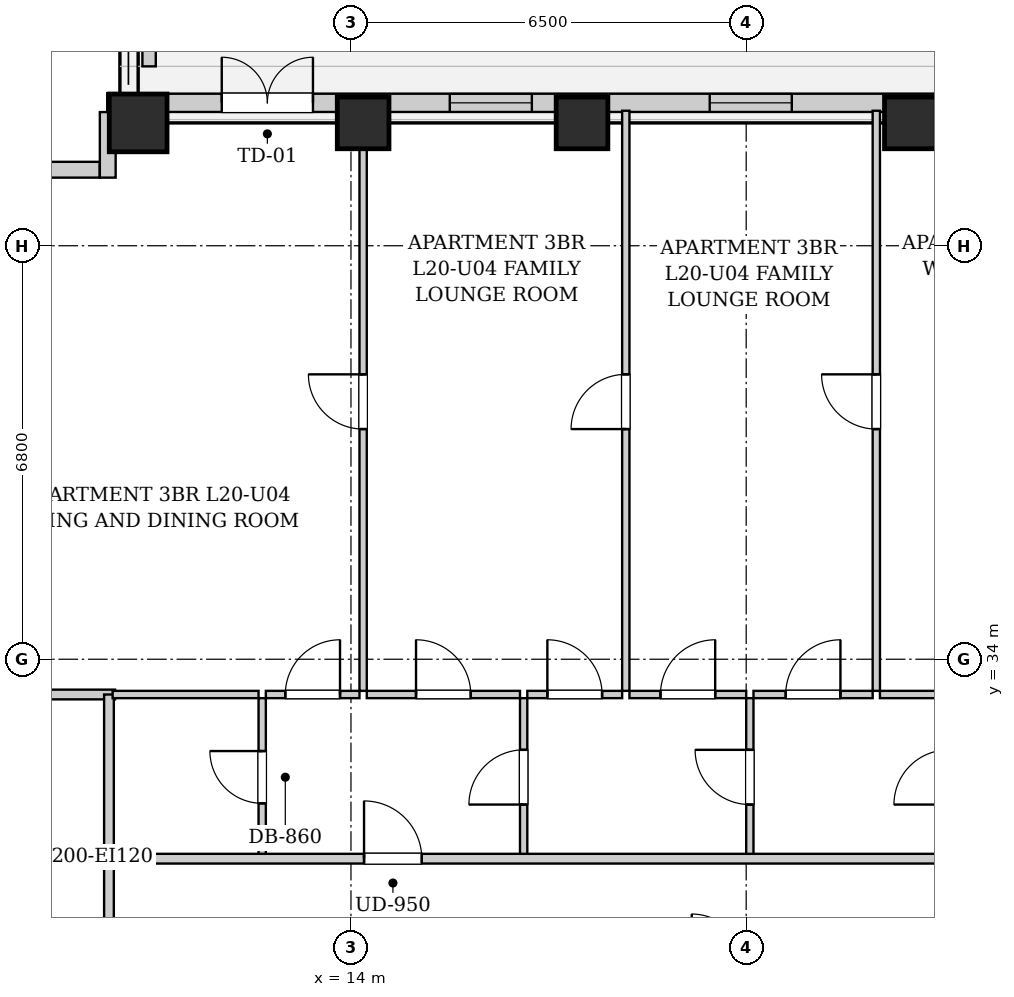
"""IFC4 building model, lengths in metres.
Left out: names, types, materials, properties, quantities, classifications, styles, units other than length and angle.
Written with IfcOpenShell. Run it as: python <this file> out.ifc"""

import sys

from ifc_helpers import new_model, si_unit, direction, frame, frame_2d, origin, origin_2d, place, context, subcontext, project, spatial, rectangle, extrude, element, fill, save


model = new_model("IFC4")
c1 = context("Model", 3, precision=1e-05, world=origin(), true_north=direction((0.0, 1.0)))
c2 = subcontext(c1, "Body", "Model", "MODEL_VIEW")
j1 = project(units=[si_unit("LENGTHUNIT", "METRE"), si_unit("PLANEANGLEUNIT", "RADIAN")], contexts=[c1])
p1 = place(None, origin())
s1 = spatial("IfcSite", under=j1, at=p1, CompositionType="ELEMENT")
p2 = place(p1, origin())
s2 = spatial("IfcBuilding", under=s1, at=p2, CompositionType="ELEMENT")
p3 = place(p2, frame((0.0, 0.0, 75.1)))
s3 = spatial("IfcBuildingStorey", under=s2, at=p3, CompositionType="ELEMENT", Elevation=75.1)
p4 = place(p3, frame((10.5, 42.82, 0.0), z_axis=(0.0, 0.0, 1.0), x_axis=(1.0, 0.0, 0.0)))
e1 = element("IfcColumn", 1, at=p4, inside=s3, PredefinedType="COLUMN", context=c2, shape_type="SweptSolid", body=[
    extrude(rectangle(XDim=0.95, YDim=0.95, at=origin_2d()), origin(), (0.0, 0.0, 1.0), 3.2),
])
for number, where, z_axis, x_axis in (
    (2, (14.2, 42.82, 0.0), (0.0, 0.0, 1.0), (1.0, 0.0, 0.0)),
    (3, (17.8, 42.82, 0.0), (0.0, 0.0, 1.0), (1.0, 0.0, 0.0)),
    (4, (23.2, 42.82, 0.0), (0.0, 0.0, 1.0), (1.0, 0.0, 0.0)),
):
    element("IfcColumn", number, at=place(p3, frame(where, z_axis=z_axis, x_axis=x_axis)), inside=s3, PredefinedType="COLUMN", context=c2, shape_type="SweptSolid", body=[
        extrude(rectangle(XDim=0.85, YDim=0.85, at=origin_2d()), origin(), (0.0, 0.0, 1.0), 3.2),
    ])
p5 = place(p3, frame((10.0, 43.15, 0.0), z_axis=(0.0, 0.0, 1.0), x_axis=(1.0, 0.0, 0.0)))
e5 = element("IfcWall", 5, at=p5, inside=s3, PredefinedType="SOLIDWALL", context=c2, shape_type="SweptSolid", body=[
    extrude(rectangle(XDim=23.7, YDim=0.3, at=frame_2d((11.85, 0.0))), origin(), (0.0, 0.0, 1.0), 2.94),
])
p6 = place(p5, frame((1.875, 0.0, 0.0)))
e6 = element("IfcOpeningElement", 6, at=p6, cuts=e5, PredefinedType="OPENING", context=c2, shape_type="SweptSolid", body=[
    extrude(rectangle(XDim=1.5, YDim=1.982, at=frame_2d((0.75, 0.991))), frame((0.0, 0.16, 0.0), z_axis=(0.0, -1.0, 0.0), x_axis=(1.0, 0.0, 0.0)), (0.0, 0.0, 1.0), 0.32),
])
p7 = place(p5, frame((5.625, 0.0, 0.55)))
e7 = element("IfcOpeningElement", 7, at=p7, cuts=e5, PredefinedType="OPENING", context=c2, shape_type="SweptSolid", body=[
    extrude(rectangle(XDim=1.35, YDim=1.2, at=frame_2d((0.675, 0.6))), frame((0.0, 0.16, 0.0), z_axis=(0.0, -1.0, 0.0), x_axis=(1.0, 0.0, 0.0)), (0.0, 0.0, 1.0), 0.32),
])
p8 = place(p5, frame((9.9, 0.0, 0.55)))
e8 = element("IfcOpeningElement", 8, at=p8, cuts=e5, PredefinedType="OPENING", context=c2, shape_type="SweptSolid", body=[
    extrude(rectangle(XDim=1.35, YDim=1.2, at=frame_2d((0.675, 0.6))), frame((0.0, 0.16, 0.0), z_axis=(0.0, -1.0, 0.0), x_axis=(1.0, 0.0, 0.0)), (0.0, 0.0, 1.0), 0.32),
])
p9 = place(p5, frame((18.675, 0.0, 0.55)))
e9 = element("IfcOpeningElement", 9, at=p9, cuts=e5, PredefinedType="OPENING", context=c2, shape_type="SweptSolid", body=[
    extrude(rectangle(XDim=1.35, YDim=1.2, at=frame_2d((0.675, 0.6))), frame((0.0, 0.16, 0.0), z_axis=(0.0, -1.0, 0.0), x_axis=(1.0, 0.0, 0.0)), (0.0, 0.0, 1.0), 0.32),
])
p10 = place(p5, frame((21.265, 0.0, 0.55)))
e10 = element("IfcOpeningElement", 10, at=p10, cuts=e5, PredefinedType="OPENING", context=c2, shape_type="SweptSolid", body=[
    extrude(rectangle(XDim=1.35, YDim=1.2, at=frame_2d((0.675, 0.6))), frame((0.0, 0.16, 0.0), z_axis=(0.0, -1.0, 0.0), x_axis=(1.0, 0.0, 0.0)), (0.0, 0.0, 1.0), 0.32),
])
p11 = place(p3, frame((8.882, 42.05, 0.0), z_axis=(0.0, 0.0, 1.0), x_axis=(1.0, 0.0, 0.0)))
e11 = element("IfcWall", 11, at=p11, inside=s3, PredefinedType="SOLIDWALL", context=c2, shape_type="SweptSolid", body=[
    extrude(rectangle(XDim=0.986, YDim=0.26, at=frame_2d((0.493, 0.0))), origin(), (0.0, 0.0, 1.0), 2.94),
])
p12 = place(p3, frame((10.0, 41.92, 0.0), z_axis=(0.0, 0.0, 1.0), x_axis=(0.0, 1.0, 0.0)))
e12 = element("IfcWall", 12, at=p12, inside=s3, PredefinedType="SOLIDWALL", context=c2, shape_type="SweptSolid", body=[
    extrude(rectangle(XDim=1.078, YDim=0.26, at=frame_2d((0.539, 0.0))), origin(), (0.0, 0.0, 1.0), 2.94),
])
p13 = place(p3, frame((10.68, 43.75, 0.0), z_axis=(0.0, 0.0, 1.0), x_axis=(0.0, 1.0, 0.0)))
e13 = element("IfcWall", 13, at=p13, inside=s3, PredefinedType="PARAPET", context=c2, shape_type="SweptSolid", body=[
    extrude(rectangle(XDim=3.0, YDim=0.22, at=frame_2d((1.5, 0.0))), origin(), (0.0, 0.0, 1.0), 0.65),
])
p14 = place(p3, frame((10.02, 28.98, 0.0), z_axis=(0.0, 0.0, 1.0), x_axis=(0.0, 1.0, 0.0)))
e14 = element("IfcWall", 14, at=p14, inside=s3, PredefinedType="PARTITIONING", context=c2, shape_type="SweptSolid", body=[
    extrude(rectangle(XDim=1.74, YDim=0.16, at=frame_2d((0.87, 0.0))), origin(), (0.0, 0.0, 1.0), 2.94),
])
p15 = place(p3, frame((7.78, 33.42, 0.0), z_axis=(0.0, 0.0, 1.0), x_axis=(1.0, 0.0, 0.0)))
e15 = element("IfcWall", 15, at=p15, inside=s3, PredefinedType="PARTITIONING", context=c2, shape_type="SweptSolid", body=[
    extrude(rectangle(XDim=2.34, YDim=0.16, at=frame_2d((1.17, 0.0))), origin(), (0.0, 0.0, 1.0), 2.94),
])
p16 = place(p3, frame((10.02, 30.76, 0.0), z_axis=(0.0, 0.0, 1.0), x_axis=(0.0, 1.0, 0.0)))
e16 = element("IfcWall", 16, at=p16, inside=s3, PredefinedType="PARTITIONING", context=c2, shape_type="SweptSolid", body=[
    extrude(rectangle(XDim=2.66, YDim=0.16, at=frame_2d((1.33, 0.0))), origin(), (0.0, 0.0, 1.0), 2.94),
])
p17 = place(p3, frame((12.54, 30.76, 0.0), z_axis=(0.0, 0.0, 1.0), x_axis=(0.0, 1.0, 0.0)))
e17 = element("IfcWall", 17, at=p17, inside=s3, PredefinedType="PARTITIONING", context=c2, shape_type="SweptSolid", body=[
    extrude(rectangle(XDim=2.6, YDim=0.12, at=frame_2d((1.3, 0.0))), origin(), (0.0, 0.0, 1.0), 2.94),
])
p18 = place(p17, frame((0.87, 0.0, 0.0)))
e18 = element("IfcOpeningElement", 18, at=p18, cuts=e17, PredefinedType="OPENING", context=c2, shape_type="SweptSolid", body=[
    extrude(rectangle(XDim=0.86, YDim=2.05, at=frame_2d((0.43, 1.025))), frame((0.0, 0.07, 0.0), z_axis=(0.0, -1.0, 0.0), x_axis=(1.0, 0.0, 0.0)), (0.0, 0.0, 1.0), 0.14),
])
p19 = place(p3, frame((10.08, 33.42, 0.0), z_axis=(0.0, 0.0, 1.0), x_axis=(1.0, 0.0, 0.0)))
e19 = element("IfcWall", 19, at=p19, inside=s3, PredefinedType="PARTITIONING", context=c2, shape_type="SweptSolid", body=[
    extrude(rectangle(XDim=2.4, YDim=0.12, at=frame_2d((1.2, 0.0))), origin(), (0.0, 0.0, 1.0), 2.94),
])
p20 = place(p3, frame((16.84, 30.76, 0.0), z_axis=(0.0, 0.0, 1.0), x_axis=(0.0, 1.0, 0.0)))
e20 = element("IfcWall", 20, at=p20, inside=s3, PredefinedType="PARTITIONING", context=c2, shape_type="SweptSolid", body=[
    extrude(rectangle(XDim=2.6, YDim=0.12, at=frame_2d((1.3, 0.0))), origin(), (0.0, 0.0, 1.0), 2.94),
])
p21 = place(p20, frame((0.85, 0.0, 0.0)))
e21 = element("IfcOpeningElement", 21, at=p21, cuts=e20, PredefinedType="OPENING", context=c2, shape_type="SweptSolid", body=[
    extrude(rectangle(XDim=0.9, YDim=2.05, at=frame_2d((0.45, 1.025))), frame((0.0, 0.07, 0.0), z_axis=(0.0, -1.0, 0.0), x_axis=(1.0, 0.0, 0.0)), (0.0, 0.0, 1.0), 0.14),
])
p22 = place(p3, frame((12.6, 33.42, 0.0), z_axis=(0.0, 0.0, 1.0), x_axis=(1.0, 0.0, 0.0)))
e22 = element("IfcWall", 22, at=p22, inside=s3, PredefinedType="PARTITIONING", context=c2, shape_type="SweptSolid", body=[
    extrude(rectangle(XDim=1.54, YDim=0.12, at=frame_2d((0.77, 0.0))), origin(), (0.0, 0.0, 1.0), 2.94),
])
p23 = place(p22, frame((0.32, 0.0, 0.0)))
e23 = element("IfcOpeningElement", 23, at=p23, cuts=e22, PredefinedType="OPENING", context=c2, shape_type="SweptSolid", body=[
    extrude(rectangle(XDim=0.9, YDim=2.05, at=frame_2d((0.45, 1.025))), frame((0.0, 0.07, 0.0), z_axis=(0.0, -1.0, 0.0), x_axis=(1.0, 0.0, 0.0)), (0.0, 0.0, 1.0), 0.14),
])
p24 = place(p3, frame((14.26, 33.42, 0.0), z_axis=(0.0, 0.0, 1.0), x_axis=(1.0, 0.0, 0.0)))
e24 = element("IfcWall", 24, at=p24, inside=s3, PredefinedType="PARTITIONING", context=c2, shape_type="SweptSolid", body=[
    extrude(rectangle(XDim=2.52, YDim=0.12, at=frame_2d((1.26, 0.0))), origin(), (0.0, 0.0, 1.0), 2.94),
])
p25 = place(p24, frame((0.81, 0.0, 0.0)))
e25 = element("IfcOpeningElement", 25, at=p25, cuts=e24, PredefinedType="OPENING", context=c2, shape_type="SweptSolid", body=[
    extrude(rectangle(XDim=0.9, YDim=2.05, at=frame_2d((0.45, 1.025))), frame((0.0, 0.07, 0.0), z_axis=(0.0, -1.0, 0.0), x_axis=(1.0, 0.0, 0.0)), (0.0, 0.0, 1.0), 0.14),
])
p26 = place(p3, frame((20.56, 30.76, 0.0), z_axis=(0.0, 0.0, 1.0), x_axis=(0.0, 1.0, 0.0)))
e26 = element("IfcWall", 26, at=p26, inside=s3, PredefinedType="PARTITIONING", context=c2, shape_type="SweptSolid", body=[
    extrude(rectangle(XDim=2.6, YDim=0.12, at=frame_2d((1.3, 0.0))), origin(), (0.0, 0.0, 1.0), 2.94),
])
p27 = place(p26, frame((0.85, 0.0, 0.0)))
e27 = element("IfcOpeningElement", 27, at=p27, cuts=e26, PredefinedType="OPENING", context=c2, shape_type="SweptSolid", body=[
    extrude(rectangle(XDim=0.9, YDim=2.05, at=frame_2d((0.45, 1.025))), frame((0.0, 0.07, 0.0), z_axis=(0.0, -1.0, 0.0), x_axis=(1.0, 0.0, 0.0)), (0.0, 0.0, 1.0), 0.14),
])
p28 = place(p3, frame((16.9, 33.42, 0.0), z_axis=(0.0, 0.0, 1.0), x_axis=(1.0, 0.0, 0.0)))
e28 = element("IfcWall", 28, at=p28, inside=s3, PredefinedType="PARTITIONING", context=c2, shape_type="SweptSolid", body=[
    extrude(rectangle(XDim=1.56, YDim=0.12, at=frame_2d((0.78, 0.0))), origin(), (0.0, 0.0, 1.0), 2.94),
])
p29 = place(p28, frame((0.33, 0.0, 0.0)))
e29 = element("IfcOpeningElement", 29, at=p29, cuts=e28, PredefinedType="OPENING", context=c2, shape_type="SweptSolid", body=[
    extrude(rectangle(XDim=0.9, YDim=2.05, at=frame_2d((0.45, 1.025))), frame((0.0, 0.07, 0.0), z_axis=(0.0, -1.0, 0.0), x_axis=(1.0, 0.0, 0.0)), (0.0, 0.0, 1.0), 0.14),
])
p30 = place(p3, frame((18.58, 33.42, 0.0), z_axis=(0.0, 0.0, 1.0), x_axis=(1.0, 0.0, 0.0)))
e30 = element("IfcWall", 30, at=p30, inside=s3, PredefinedType="PARTITIONING", context=c2, shape_type="SweptSolid", body=[
    extrude(rectangle(XDim=1.92, YDim=0.12, at=frame_2d((0.96, 0.0))), origin(), (0.0, 0.0, 1.0), 2.94),
])
p31 = place(p30, frame((0.51, 0.0, 0.0)))
e31 = element("IfcOpeningElement", 31, at=p31, cuts=e30, PredefinedType="OPENING", context=c2, shape_type="SweptSolid", body=[
    extrude(rectangle(XDim=0.9, YDim=2.05, at=frame_2d((0.45, 1.025))), frame((0.0, 0.07, 0.0), z_axis=(0.0, -1.0, 0.0), x_axis=(1.0, 0.0, 0.0)), (0.0, 0.0, 1.0), 0.14),
])
p32 = place(p3, frame((20.62, 33.42, 0.0), z_axis=(0.0, 0.0, 1.0), x_axis=(1.0, 0.0, 0.0)))
e32 = element("IfcWall", 32, at=p32, inside=s3, PredefinedType="PARTITIONING", context=c2, shape_type="SweptSolid", body=[
    extrude(rectangle(XDim=1.96, YDim=0.12, at=frame_2d((0.98, 0.0))), origin(), (0.0, 0.0, 1.0), 2.94),
])
p33 = place(p32, frame((0.53, 0.0, 0.0)))
e33 = element("IfcOpeningElement", 33, at=p33, cuts=e32, PredefinedType="OPENING", context=c2, shape_type="SweptSolid", body=[
    extrude(rectangle(XDim=0.9, YDim=2.05, at=frame_2d((0.45, 1.025))), frame((0.0, 0.07, 0.0), z_axis=(0.0, -1.0, 0.0), x_axis=(1.0, 0.0, 0.0)), (0.0, 0.0, 1.0), 0.14),
])
p34 = place(p3, frame((22.7, 33.42, 0.0), z_axis=(0.0, 0.0, 1.0), x_axis=(1.0, 0.0, 0.0)))
e34 = element("IfcWall", 34, at=p34, inside=s3, PredefinedType="PARTITIONING", context=c2, shape_type="SweptSolid", body=[
    extrude(rectangle(XDim=1.07, YDim=0.12, at=frame_2d((0.535, 0.0))), origin(), (0.0, 0.0, 1.0), 2.94),
])
p35 = place(p3, frame((14.2, 33.48, 0.0), z_axis=(0.0, 0.0, 1.0), x_axis=(0.0, 1.0, 0.0)))
e35 = element("IfcWall", 35, at=p35, inside=s3, PredefinedType="PARTITIONING", context=c2, shape_type="SweptSolid", body=[
    extrude(rectangle(XDim=9.54, YDim=0.12, at=frame_2d((4.77, 0.0))), origin(), (0.0, 0.0, 1.0), 2.94),
])
p36 = place(p35, frame((4.305, 0.0, 0.0)))
e36 = element("IfcOpeningElement", 36, at=p36, cuts=e35, PredefinedType="OPENING", context=c2, shape_type="SweptSolid", body=[
    extrude(rectangle(XDim=0.9, YDim=2.05, at=frame_2d((0.45, 1.025))), frame((0.0, 0.07, 0.0), z_axis=(0.0, -1.0, 0.0), x_axis=(1.0, 0.0, 0.0)), (0.0, 0.0, 1.0), 0.14),
])
p37 = place(p3, frame((18.52, 33.48, 0.0), z_axis=(0.0, 0.0, 1.0), x_axis=(0.0, 1.0, 0.0)))
e37 = element("IfcWall", 37, at=p37, inside=s3, PredefinedType="PARTITIONING", context=c2, shape_type="SweptSolid", body=[
    extrude(rectangle(XDim=9.54, YDim=0.12, at=frame_2d((4.77, 0.0))), origin(), (0.0, 0.0, 1.0), 2.94),
])
p38 = place(p37, frame((4.305, 0.0, 0.0)))
e38 = element("IfcOpeningElement", 38, at=p38, cuts=e37, PredefinedType="OPENING", context=c2, shape_type="SweptSolid", body=[
    extrude(rectangle(XDim=0.9, YDim=2.05, at=frame_2d((0.45, 1.025))), frame((0.0, 0.07, 0.0), z_axis=(0.0, -1.0, 0.0), x_axis=(1.0, 0.0, 0.0)), (0.0, 0.0, 1.0), 0.14),
])
p39 = place(p3, frame((22.64, 33.48, 0.0), z_axis=(0.0, 0.0, 1.0), x_axis=(0.0, 1.0, 0.0)))
e39 = element("IfcWall", 39, at=p39, inside=s3, PredefinedType="PARTITIONING", context=c2, shape_type="SweptSolid", body=[
    extrude(rectangle(XDim=9.54, YDim=0.12, at=frame_2d((4.77, 0.0))), origin(), (0.0, 0.0, 1.0), 2.94),
])
p40 = place(p39, frame((4.305, 0.0, 0.0)))
e40 = element("IfcOpeningElement", 40, at=p40, cuts=e39, PredefinedType="OPENING", context=c2, shape_type="SweptSolid", body=[
    extrude(rectangle(XDim=0.9, YDim=2.05, at=frame_2d((0.45, 1.025))), frame((0.0, 0.07, 0.0), z_axis=(0.0, -1.0, 0.0), x_axis=(1.0, 0.0, 0.0)), (0.0, 0.0, 1.0), 0.14),
])
p41 = place(p3, frame((10.05, 30.72, 0.0), z_axis=(0.0, 0.0, 1.0), x_axis=(1.0, 0.0, 0.0)))
e41 = element("IfcWall", 41, at=p41, inside=s3, PredefinedType="PARTITIONING", context=c2, shape_type="SweptSolid", body=[
    extrude(rectangle(XDim=30.8, YDim=0.16, at=frame_2d((15.4, 0.0))), origin(), (0.0, 0.0, 1.0), 2.94),
])
p42 = place(p41, frame((4.165, 0.0, 0.0)))
e42 = element("IfcOpeningElement", 42, at=p42, cuts=e41, PredefinedType="OPENING", context=c2, shape_type="SweptSolid", body=[
    extrude(rectangle(XDim=0.95, YDim=2.1, at=frame_2d((0.475, 1.05))), frame((0.0, 0.09, 0.0), z_axis=(0.0, -1.0, 0.0), x_axis=(1.0, 0.0, 0.0)), (0.0, 0.0, 1.0), 0.18),
])
p43 = place(p18, origin())
e43 = element("IfcDoor", 43, at=p43, inside=s3, OperationType="SINGLE_SWING_RIGHT", PredefinedType="DOOR", context=c2, shape_type="SweptSolid", body=[
    extrude(rectangle(XDim=0.86, YDim=2.05, at=frame_2d((0.43, 1.025))), frame((0.0, 0.025, 0.0), z_axis=(0.0, -1.0, 0.0), x_axis=(1.0, 0.0, 0.0)), (0.0, 0.0, 1.0), 0.05),
])
fill(e18, e43)
p44 = place(p21, origin())
e44 = element("IfcDoor", 44, at=p44, inside=s3, OperationType="SINGLE_SWING_LEFT", PredefinedType="DOOR", context=c2, shape_type="SweptSolid", body=[
    extrude(rectangle(XDim=0.9, YDim=2.05, at=frame_2d((0.45, 1.025))), frame((0.0, 0.025, 0.0), z_axis=(0.0, -1.0, 0.0), x_axis=(1.0, 0.0, 0.0)), (0.0, 0.0, 1.0), 0.05),
])
fill(e21, e44)
p45 = place(p23, origin())
e45 = element("IfcDoor", 45, at=p45, inside=s3, OperationType="SINGLE_SWING_RIGHT", PredefinedType="DOOR", context=c2, shape_type="SweptSolid", body=[
    extrude(rectangle(XDim=0.9, YDim=2.05, at=frame_2d((0.45, 1.025))), frame((0.0, 0.025, 0.0), z_axis=(0.0, -1.0, 0.0), x_axis=(1.0, 0.0, 0.0)), (0.0, 0.0, 1.0), 0.05),
])
fill(e23, e45)
p46 = place(p25, origin())
e46 = element("IfcDoor", 46, at=p46, inside=s3, OperationType="SINGLE_SWING_LEFT", PredefinedType="DOOR", context=c2, shape_type="SweptSolid", body=[
    extrude(rectangle(XDim=0.9, YDim=2.05, at=frame_2d((0.45, 1.025))), frame((0.0, 0.025, 0.0), z_axis=(0.0, -1.0, 0.0), x_axis=(1.0, 0.0, 0.0)), (0.0, 0.0, 1.0), 0.05),
])
fill(e25, e46)
p47 = place(p27, origin())
e47 = element("IfcDoor", 47, at=p47, inside=s3, OperationType="SINGLE_SWING_RIGHT", PredefinedType="DOOR", context=c2, shape_type="SweptSolid", body=[
    extrude(rectangle(XDim=0.9, YDim=2.05, at=frame_2d((0.45, 1.025))), frame((0.0, 0.025, 0.0), z_axis=(0.0, -1.0, 0.0), x_axis=(1.0, 0.0, 0.0)), (0.0, 0.0, 1.0), 0.05),
])
fill(e27, e47)
p48 = place(p29, origin())
e48 = element("IfcDoor", 48, at=p48, inside=s3, OperationType="SINGLE_SWING_LEFT", PredefinedType="DOOR", context=c2, shape_type="SweptSolid", body=[
    extrude(rectangle(XDim=0.9, YDim=2.05, at=frame_2d((0.45, 1.025))), frame((0.0, 0.025, 0.0), z_axis=(0.0, -1.0, 0.0), x_axis=(1.0, 0.0, 0.0)), (0.0, 0.0, 1.0), 0.05),
])
fill(e29, e48)
p49 = place(p31, origin())
e49 = element("IfcDoor", 49, at=p49, inside=s3, OperationType="SINGLE_SWING_RIGHT", PredefinedType="DOOR", context=c2, shape_type="SweptSolid", body=[
    extrude(rectangle(XDim=0.9, YDim=2.05, at=frame_2d((0.45, 1.025))), frame((0.0, 0.025, 0.0), z_axis=(0.0, -1.0, 0.0), x_axis=(1.0, 0.0, 0.0)), (0.0, 0.0, 1.0), 0.05),
])
fill(e31, e49)
p50 = place(p33, origin())
e50 = element("IfcDoor", 50, at=p50, inside=s3, OperationType="SINGLE_SWING_RIGHT", PredefinedType="DOOR", context=c2, shape_type="SweptSolid", body=[
    extrude(rectangle(XDim=0.9, YDim=2.05, at=frame_2d((0.45, 1.025))), frame((0.0, 0.025, 0.0), z_axis=(0.0, -1.0, 0.0), x_axis=(1.0, 0.0, 0.0)), (0.0, 0.0, 1.0), 0.05),
])
fill(e33, e50)
p51 = place(p36, origin())
e51 = element("IfcDoor", 51, at=p51, inside=s3, OperationType="SINGLE_SWING_RIGHT", PredefinedType="DOOR", context=c2, shape_type="SweptSolid", body=[
    extrude(rectangle(XDim=0.9, YDim=2.05, at=frame_2d((0.45, 1.025))), frame((0.0, 0.025, 0.0), z_axis=(0.0, -1.0, 0.0), x_axis=(1.0, 0.0, 0.0)), (0.0, 0.0, 1.0), 0.05),
])
fill(e36, e51)
p52 = place(p38, origin())
e52 = element("IfcDoor", 52, at=p52, inside=s3, OperationType="SINGLE_SWING_LEFT", PredefinedType="DOOR", context=c2, shape_type="SweptSolid", body=[
    extrude(rectangle(XDim=0.9, YDim=2.05, at=frame_2d((0.45, 1.025))), frame((0.0, 0.025, 0.0), z_axis=(0.0, -1.0, 0.0), x_axis=(1.0, 0.0, 0.0)), (0.0, 0.0, 1.0), 0.05),
])
fill(e38, e52)
p53 = place(p40, origin())
e53 = element("IfcDoor", 53, at=p53, inside=s3, OperationType="SINGLE_SWING_RIGHT", PredefinedType="DOOR", context=c2, shape_type="SweptSolid", body=[
    extrude(rectangle(XDim=0.9, YDim=2.05, at=frame_2d((0.45, 1.025))), frame((0.0, 0.025, 0.0), z_axis=(0.0, -1.0, 0.0), x_axis=(1.0, 0.0, 0.0)), (0.0, 0.0, 1.0), 0.05),
])
fill(e40, e53)
p54 = place(p42, origin())
e54 = element("IfcDoor", 54, at=p54, inside=s3, OperationType="SINGLE_SWING_LEFT", PredefinedType="DOOR", context=c2, shape_type="SweptSolid", body=[
    extrude(rectangle(XDim=0.95, YDim=2.1, at=frame_2d((0.475, 1.05))), frame((0.0, 0.025, 0.0), z_axis=(0.0, -1.0, 0.0), x_axis=(1.0, 0.0, 0.0)), (0.0, 0.0, 1.0), 0.05),
])
fill(e42, e54)
p55 = place(p6, origin())
e55 = element("IfcDoor", 55, at=p55, inside=s3, OperationType="DOUBLE_SWING_LEFT", PredefinedType="DOOR", context=c2, shape_type="SweptSolid", body=[
    extrude(rectangle(XDim=1.5, YDim=1.982, at=frame_2d((0.75, 0.991))), frame((0.0, 0.025, 0.0), z_axis=(0.0, -1.0, 0.0), x_axis=(1.0, 0.0, 0.0)), (0.0, 0.0, 1.0), 0.05),
])
fill(e6, e55)
p56 = place(p7, origin())
e56 = element("IfcWindow", 56, at=p56, inside=s3, PartitioningType="SINGLE_PANEL", PredefinedType="WINDOW", context=c2, shape_type="SweptSolid", body=[
    extrude(rectangle(XDim=1.35, YDim=1.2, at=frame_2d((0.675, 0.6))), frame((0.0, 0.03, 0.0), z_axis=(0.0, -1.0, 0.0), x_axis=(1.0, 0.0, 0.0)), (0.0, 0.0, 1.0), 0.06),
])
fill(e7, e56)
p57 = place(p8, origin())
e57 = element("IfcWindow", 57, at=p57, inside=s3, PartitioningType="SINGLE_PANEL", PredefinedType="WINDOW", context=c2, shape_type="SweptSolid", body=[
    extrude(rectangle(XDim=1.35, YDim=1.2, at=frame_2d((0.675, 0.6))), frame((0.0, 0.03, 0.0), z_axis=(0.0, -1.0, 0.0), x_axis=(1.0, 0.0, 0.0)), (0.0, 0.0, 1.0), 0.06),
])
fill(e8, e57)
save(model, sys.argv[1])
